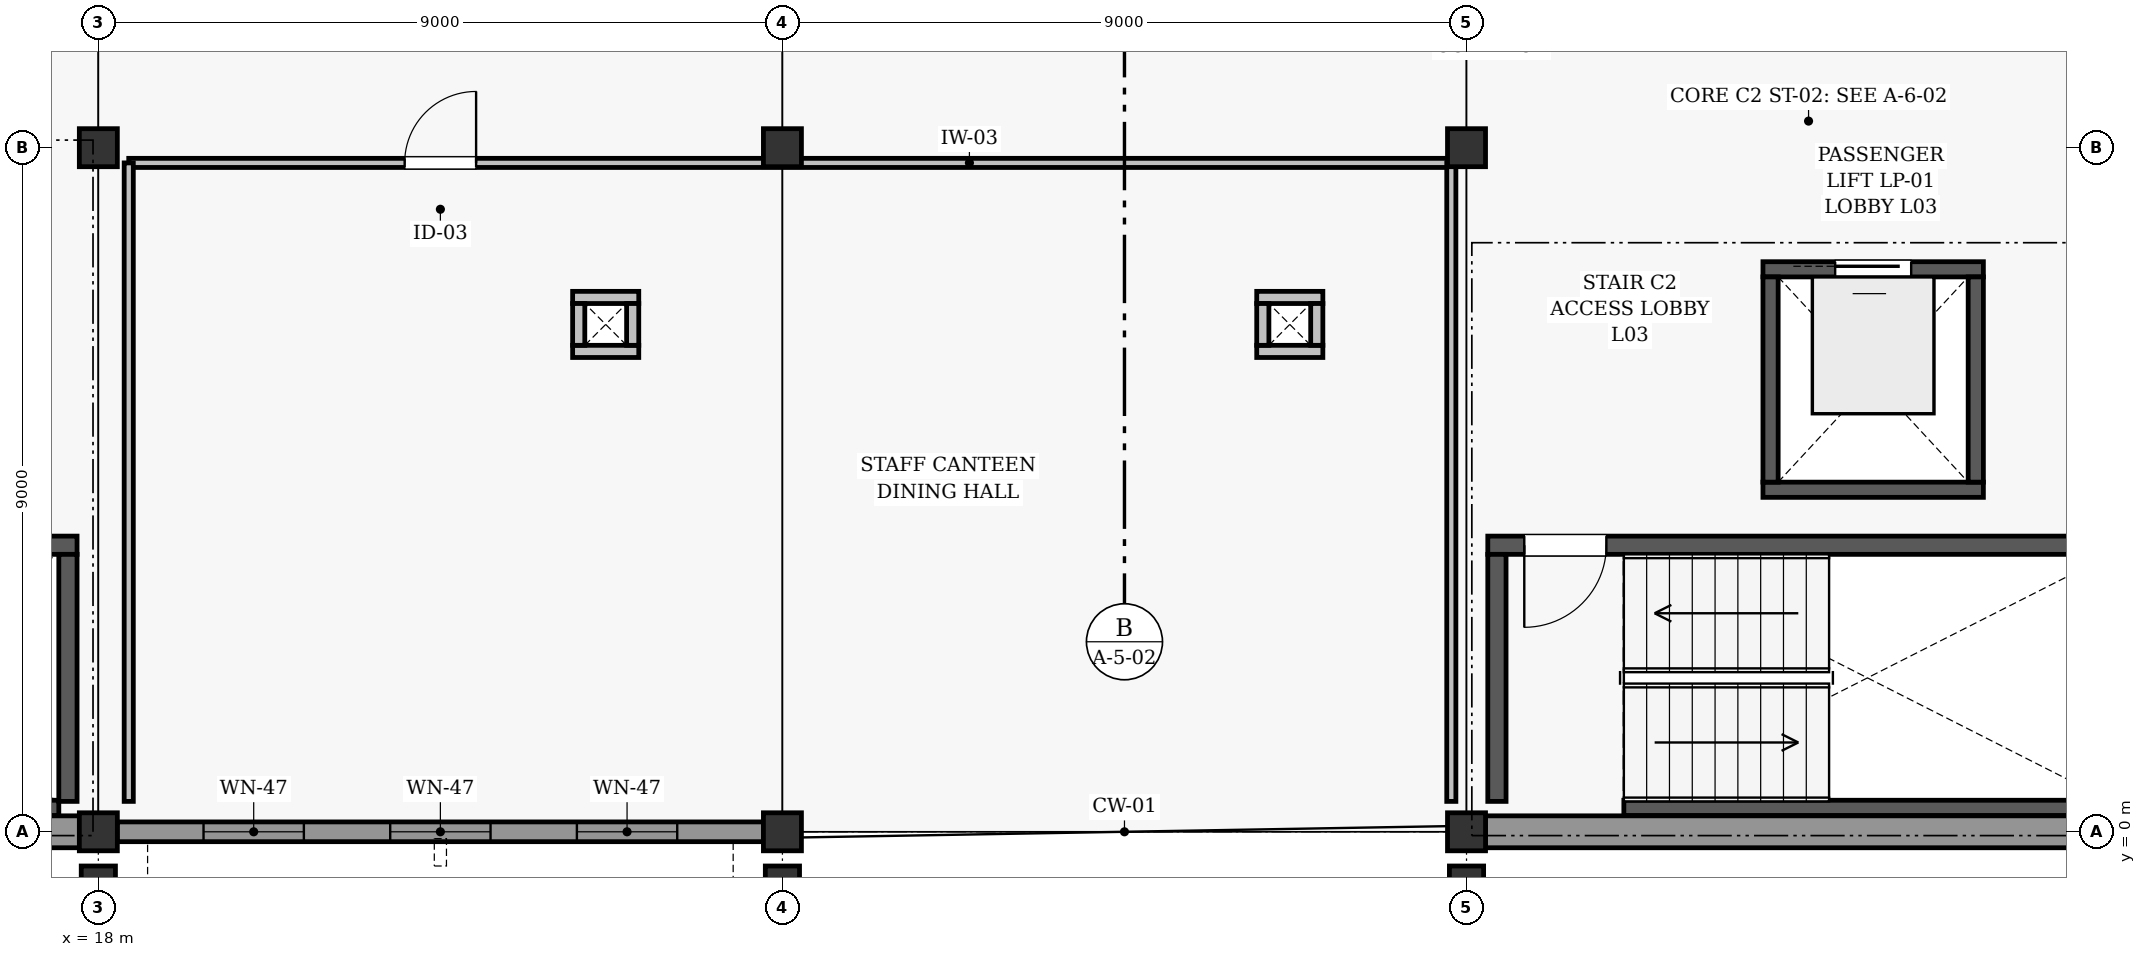
"""IFC4 building model, lengths in metres.
Left out: names, types, materials, properties, quantities, classifications, styles, units other than length and angle.
Written with IfcOpenShell. Run it as: python <this file> out.ifc"""

import sys

from ifc_helpers import new_model, si_unit, direction, frame, frame_2d, origin, origin_2d, place, context, subcontext, project, spatial, rectangle, extrude, element, fill, save


model = new_model("IFC4")
c1 = context("Model", 3, precision=1e-05, world=origin(), true_north=direction((0.0, 1.0)))
c2 = subcontext(c1, "Body", "Model", "MODEL_VIEW")
j1 = project(units=[si_unit("LENGTHUNIT", "METRE"), si_unit("PLANEANGLEUNIT", "RADIAN")], contexts=[c1])
p1 = place(None, origin())
s1 = spatial("IfcSite", under=j1, at=p1, CompositionType="ELEMENT")
p2 = place(p1, origin())
s2 = spatial("IfcBuilding", under=s1, at=p2, CompositionType="ELEMENT")
p3 = place(p2, frame((0.0, 0.0, 12.0)))
s3 = spatial("IfcBuildingStorey", under=s2, at=p3, CompositionType="ELEMENT", Elevation=12.0)
for number, where, z_axis, x_axis in (
    (1, (18.0, 0.0, 0.0), (0.0, 0.0, 1.0), (1.0, 0.0, 0.0)),
    (2, (18.0, 9.0, 0.0), (0.0, 0.0, 1.0), (1.0, 0.0, 0.0)),
    (3, (27.0, 0.0, 0.0), (0.0, 0.0, 1.0), (1.0, 0.0, 0.0)),
    (4, (27.0, 9.0, 0.0), (0.0, 0.0, 1.0), (1.0, 0.0, 0.0)),
    (5, (36.0, 0.0, 0.0), (0.0, 0.0, 1.0), (1.0, 0.0, 0.0)),
    (6, (36.0, 9.0, 0.0), (0.0, 0.0, 1.0), (1.0, 0.0, 0.0)),
):
    element("IfcColumn", number, at=place(p3, frame(where, z_axis=z_axis, x_axis=x_axis)), inside=s3, PredefinedType="COLUMN", context=c2, shape_type="SweptSolid", body=[
        extrude(rectangle(XDim=0.5, YDim=0.5, at=origin_2d()), origin(), (0.0, 0.0, 1.0), 3.0),
    ])
for number, where, z_axis, x_axis in (
    (7, (18.0, -0.75, 0.0), (0.0, 0.0, 1.0), (1.0, 0.0, 0.0)),
    (8, (27.0, -0.75, 0.0), (0.0, 0.0, 1.0), (1.0, 0.0, 0.0)),
    (9, (36.0, -0.75, 0.0), (0.0, 0.0, 1.0), (1.0, 0.0, 0.0)),
):
    element("IfcColumn", number, at=place(p3, frame(where, z_axis=z_axis, x_axis=x_axis)), inside=s3, PredefinedType="PILASTER", context=c2, shape_type="SweptSolid", body=[
        extrude(rectangle(XDim=0.45, YDim=0.6, at=origin_2d()), origin(), (0.0, 0.0, 1.0), 3.0),
    ])
p4 = place(p3, frame((9.248, 0.0, 0.0), z_axis=(0.0, 0.0, 1.0), x_axis=(1.0, 0.0, 0.0)))
e10 = element("IfcWall", 10, at=p4, inside=s3, PredefinedType="SOLIDWALL", context=c2, shape_type="SweptSolid", body=[
    extrude(rectangle(XDim=8.504, YDim=0.42, at=frame_2d((4.252, 0.0))), origin(), (0.0, 0.0, 1.0), 2.262),
])
p5 = place(p3, frame((18.248, 0.0, 0.0), z_axis=(0.0, 0.0, 1.0), x_axis=(1.0, 0.0, 0.0)))
e11 = element("IfcWall", 11, at=p5, inside=s3, PredefinedType="SOLIDWALL", context=c2, shape_type="SweptSolid", body=[
    extrude(rectangle(XDim=8.504, YDim=0.26, at=frame_2d((4.252, 0.0))), origin(), (0.0, 0.0, 1.0), 2.262),
])
p6 = place(p5, frame((1.136, 0.0, 0.8)))
e12 = element("IfcOpeningElement", 12, at=p6, cuts=e11, PredefinedType="OPENING", context=c2, shape_type="SweptSolid", body=[
    extrude(rectangle(XDim=1.32, YDim=1.14, at=frame_2d((0.66, 0.57))), frame((0.0, 0.14, 0.0), z_axis=(0.0, -1.0, 0.0), x_axis=(1.0, 0.0, 0.0)), (0.0, 0.0, 1.0), 0.28),
])
p7 = place(p5, frame((3.592, 0.0, 0.8)))
e13 = element("IfcOpeningElement", 13, at=p7, cuts=e11, PredefinedType="OPENING", context=c2, shape_type="SweptSolid", body=[
    extrude(rectangle(XDim=1.32, YDim=1.14, at=frame_2d((0.66, 0.57))), frame((0.0, 0.14, 0.0), z_axis=(0.0, -1.0, 0.0), x_axis=(1.0, 0.0, 0.0)), (0.0, 0.0, 1.0), 0.28),
])
p8 = place(p5, frame((6.048, 0.0, 0.8)))
e14 = element("IfcOpeningElement", 14, at=p8, cuts=e11, PredefinedType="OPENING", context=c2, shape_type="SweptSolid", body=[
    extrude(rectangle(XDim=1.32, YDim=1.14, at=frame_2d((0.66, 0.57))), frame((0.0, 0.14, 0.0), z_axis=(0.0, -1.0, 0.0), x_axis=(1.0, 0.0, 0.0)), (0.0, 0.0, 1.0), 0.28),
])
p9 = place(p3, frame((36.248, 0.0, 0.0), z_axis=(0.0, 0.0, 1.0), x_axis=(1.0, 0.0, 0.0)))
e15 = element("IfcWall", 15, at=p9, inside=s3, PredefinedType="SOLIDWALL", context=c2, shape_type="SweptSolid", body=[
    extrude(rectangle(XDim=8.504, YDim=0.42, at=frame_2d((4.252, 0.0))), origin(), (0.0, 0.0, 1.0), 2.262),
])
p10 = place(p3, frame((11.07, 0.315, 0.0), z_axis=(0.0, 0.0, 1.0), x_axis=(1.0, 0.0, 0.0)))
e16 = element("IfcWall", 16, at=p10, inside=s3, PredefinedType="SHEAR", context=c2, shape_type="SweptSolid", body=[
    extrude(rectangle(XDim=6.41, YDim=0.2, at=frame_2d((3.205, 0.0))), origin(), (0.0, 0.0, 1.0), 2.75),
])
p11 = place(p3, frame((9.28, 3.77, 0.0), z_axis=(0.0, 0.0, 1.0), x_axis=(1.0, 0.0, 0.0)))
e17 = element("IfcWall", 17, at=p11, inside=s3, PredefinedType="SHEAR", context=c2, shape_type="SweptSolid", body=[
    extrude(rectangle(XDim=8.44, YDim=0.24, at=frame_2d((4.22, 0.0))), origin(), (0.0, 0.0, 1.0), 2.75),
])
p12 = place(p11, frame((0.48, 0.0, 0.0)))
e18 = element("IfcOpeningElement", 18, at=p12, cuts=e17, PredefinedType="OPENING", context=c2, shape_type="SweptSolid", body=[
    extrude(rectangle(XDim=1.08, YDim=2.08, at=frame_2d((0.54, 1.04))), frame((0.0, 0.13, 0.0), z_axis=(0.0, -1.0, 0.0), x_axis=(1.0, 0.0, 0.0)), (0.0, 0.0, 1.0), 0.26),
])
p13 = place(p3, frame((17.6, 0.4, 0.0), z_axis=(0.0, 0.0, 1.0), x_axis=(0.0, 1.0, 0.0)))
e19 = element("IfcWall", 19, at=p13, inside=s3, PredefinedType="SHEAR", context=c2, shape_type="SweptSolid", body=[
    extrude(rectangle(XDim=3.25, YDim=0.24, at=frame_2d((1.625, 0.0))), origin(), (0.0, 0.0, 1.0), 2.75),
])
p14 = place(p3, frame((38.07, 0.315, 0.0), z_axis=(0.0, 0.0, 1.0), x_axis=(1.0, 0.0, 0.0)))
e20 = element("IfcWall", 20, at=p14, inside=s3, PredefinedType="SHEAR", context=c2, shape_type="SweptSolid", body=[
    extrude(rectangle(XDim=6.41, YDim=0.2, at=frame_2d((3.205, 0.0))), origin(), (0.0, 0.0, 1.0), 2.75),
])
p15 = place(p3, frame((36.28, 3.77, 0.0), z_axis=(0.0, 0.0, 1.0), x_axis=(1.0, 0.0, 0.0)))
e21 = element("IfcWall", 21, at=p15, inside=s3, PredefinedType="SHEAR", context=c2, shape_type="SweptSolid", body=[
    extrude(rectangle(XDim=8.44, YDim=0.24, at=frame_2d((4.22, 0.0))), origin(), (0.0, 0.0, 1.0), 2.75),
])
p16 = place(p15, frame((0.48, 0.0, 0.0)))
e22 = element("IfcOpeningElement", 22, at=p16, cuts=e21, PredefinedType="OPENING", context=c2, shape_type="SweptSolid", body=[
    extrude(rectangle(XDim=1.08, YDim=2.08, at=frame_2d((0.54, 1.04))), frame((0.0, 0.13, 0.0), z_axis=(0.0, -1.0, 0.0), x_axis=(1.0, 0.0, 0.0)), (0.0, 0.0, 1.0), 0.26),
])
p17 = place(p3, frame((36.4, 0.4, 0.0), z_axis=(0.0, 0.0, 1.0), x_axis=(0.0, 1.0, 0.0)))
e23 = element("IfcWall", 23, at=p17, inside=s3, PredefinedType="SHEAR", context=c2, shape_type="SweptSolid", body=[
    extrude(rectangle(XDim=3.25, YDim=0.24, at=frame_2d((1.625, 0.0))), origin(), (0.0, 0.0, 1.0), 2.75),
])
p18 = place(p3, frame((39.9, 4.5, 0.0), z_axis=(0.0, 0.0, 1.0), x_axis=(1.0, 0.0, 0.0)))
e24 = element("IfcWall", 24, at=p18, inside=s3, PredefinedType="SHEAR", context=c2, shape_type="SweptSolid", body=[
    extrude(rectangle(XDim=2.9, YDim=0.2, at=frame_2d((1.45, 0.0))), origin(), (0.0, 0.0, 1.0), 2.75),
])
p19 = place(p3, frame((39.9, 7.4, 0.0), z_axis=(0.0, 0.0, 1.0), x_axis=(1.0, 0.0, 0.0)))
e25 = element("IfcWall", 25, at=p19, inside=s3, PredefinedType="SHEAR", context=c2, shape_type="SweptSolid", body=[
    extrude(rectangle(XDim=2.9, YDim=0.2, at=frame_2d((1.45, 0.0))), origin(), (0.0, 0.0, 1.0), 2.75),
])
p20 = place(p19, frame((0.95, 0.0, 0.0)))
e26 = element("IfcOpeningElement", 26, at=p20, cuts=e25, PredefinedType="OPENING", context=c2, shape_type="SweptSolid", body=[
    extrude(rectangle(XDim=1.0, YDim=2.1, at=frame_2d((0.5, 1.05))), frame((0.0, 0.11, 0.0), z_axis=(0.0, -1.0, 0.0), x_axis=(1.0, 0.0, 0.0)), (0.0, 0.0, 1.0), 0.22),
])
for number, where, z_axis, x_axis in (
    (27, (40.0, 4.6, 0.0), (0.0, 0.0, 1.0), (0.0, 1.0, 0.0)),
    (28, (42.7, 4.6, 0.0), (0.0, 0.0, 1.0), (0.0, 1.0, 0.0)),
):
    element("IfcWall", number, at=place(p3, frame(where, z_axis=z_axis, x_axis=x_axis)), inside=s3, PredefinedType="SHEAR", context=c2, shape_type="SweptSolid", body=[
        extrude(rectangle(XDim=2.7, YDim=0.2, at=frame_2d((1.35, 0.0))), origin(), (0.0, 0.0, 1.0), 2.75),
    ])
for number, where, z_axis, x_axis in (
    (29, (24.24, 6.32, 0.0), (0.0, 0.0, 1.0), (1.0, 0.0, 0.0)),
    (30, (24.24, 7.03, 0.0), (0.0, 0.0, 1.0), (1.0, 0.0, 0.0)),
):
    element("IfcWall", number, at=place(p3, frame(where, z_axis=z_axis, x_axis=x_axis)), inside=s3, PredefinedType="PARTITIONING", context=c2, shape_type="SweptSolid", body=[
        extrude(rectangle(XDim=0.87, YDim=0.16, at=frame_2d((0.435, 0.0))), origin(), (0.0, 0.0, 1.0), 2.75),
    ])
for number, where, z_axis, x_axis in (
    (31, (24.32, 6.4, 0.0), (0.0, 0.0, 1.0), (0.0, 1.0, 0.0)),
    (32, (25.03, 6.4, 0.0), (0.0, 0.0, 1.0), (0.0, 1.0, 0.0)),
):
    element("IfcWall", number, at=place(p3, frame(where, z_axis=z_axis, x_axis=x_axis)), inside=s3, PredefinedType="PARTITIONING", context=c2, shape_type="SweptSolid", body=[
        extrude(rectangle(XDim=0.55, YDim=0.16, at=frame_2d((0.275, 0.0))), origin(), (0.0, 0.0, 1.0), 2.75),
    ])
for number, where, z_axis, x_axis in (
    (33, (33.24, 6.32, 0.0), (0.0, 0.0, 1.0), (1.0, 0.0, 0.0)),
    (34, (33.24, 7.03, 0.0), (0.0, 0.0, 1.0), (1.0, 0.0, 0.0)),
):
    element("IfcWall", number, at=place(p3, frame(where, z_axis=z_axis, x_axis=x_axis)), inside=s3, PredefinedType="PARTITIONING", context=c2, shape_type="SweptSolid", body=[
        extrude(rectangle(XDim=0.87, YDim=0.16, at=frame_2d((0.435, 0.0))), origin(), (0.0, 0.0, 1.0), 2.75),
    ])
for number, where, z_axis, x_axis in (
    (35, (33.32, 6.4, 0.0), (0.0, 0.0, 1.0), (0.0, 1.0, 0.0)),
    (36, (34.03, 6.4, 0.0), (0.0, 0.0, 1.0), (0.0, 1.0, 0.0)),
):
    element("IfcWall", number, at=place(p3, frame(where, z_axis=z_axis, x_axis=x_axis)), inside=s3, PredefinedType="PARTITIONING", context=c2, shape_type="SweptSolid", body=[
        extrude(rectangle(XDim=0.55, YDim=0.16, at=frame_2d((0.275, 0.0))), origin(), (0.0, 0.0, 1.0), 2.75),
    ])
p21 = place(p3, frame((18.4, 8.8, 0.0), z_axis=(0.0, 0.0, 1.0), x_axis=(1.0, 0.0, 0.0)))
e37 = element("IfcWall", 37, at=p21, inside=s3, PredefinedType="PARTITIONING", context=c2, shape_type="SweptSolid", body=[
    extrude(rectangle(XDim=17.4, YDim=0.12, at=frame_2d((8.7, 0.0))), origin(), (0.0, 0.0, 1.0), 2.295),
])
p22 = place(p21, frame((3.63, 0.0, 0.0)))
e38 = element("IfcOpeningElement", 38, at=p22, cuts=e37, PredefinedType="OPENING", context=c2, shape_type="SweptSolid", body=[
    extrude(rectangle(XDim=0.94, YDim=2.06, at=frame_2d((0.47, 1.03))), frame((0.0, 0.07, 0.0), z_axis=(0.0, -1.0, 0.0), x_axis=(1.0, 0.0, 0.0)), (0.0, 0.0, 1.0), 0.14),
])
for number, where, z_axis, x_axis in (
    (39, (18.4, 0.4, 0.0), (0.0, 0.0, 1.0), (0.0, 1.0, 0.0)),
    (40, (35.8, 0.4, 0.0), (0.0, 0.0, 1.0), (0.0, 1.0, 0.0)),
):
    element("IfcWall", number, at=place(p3, frame(where, z_axis=z_axis, x_axis=x_axis)), inside=s3, PredefinedType="PARTITIONING", context=c2, shape_type="SweptSolid", body=[
        extrude(rectangle(XDim=8.4, YDim=0.12, at=frame_2d((4.2, 0.0))), origin(), (0.0, 0.0, 1.0), 2.295),
    ])
p23 = place(p6, origin())
e41 = element("IfcWindow", 41, at=p23, inside=s3, PartitioningType="SINGLE_PANEL", PredefinedType="WINDOW", context=c2, shape_type="SweptSolid", body=[
    extrude(rectangle(XDim=1.32, YDim=1.14, at=frame_2d((0.66, 0.57))), frame((0.0, 0.03, 0.0), z_axis=(0.0, -1.0, 0.0), x_axis=(1.0, 0.0, 0.0)), (0.0, 0.0, 1.0), 0.06),
])
fill(e12, e41)
p24 = place(p7, origin())
e42 = element("IfcWindow", 42, at=p24, inside=s3, PartitioningType="SINGLE_PANEL", PredefinedType="WINDOW", context=c2, shape_type="SweptSolid", body=[
    extrude(rectangle(XDim=1.32, YDim=1.14, at=frame_2d((0.66, 0.57))), frame((0.0, 0.03, 0.0), z_axis=(0.0, -1.0, 0.0), x_axis=(1.0, 0.0, 0.0)), (0.0, 0.0, 1.0), 0.06),
])
fill(e13, e42)
p25 = place(p8, origin())
e43 = element("IfcWindow", 43, at=p25, inside=s3, PartitioningType="SINGLE_PANEL", PredefinedType="WINDOW", context=c2, shape_type="SweptSolid", body=[
    extrude(rectangle(XDim=1.32, YDim=1.14, at=frame_2d((0.66, 0.57))), frame((0.0, 0.03, 0.0), z_axis=(0.0, -1.0, 0.0), x_axis=(1.0, 0.0, 0.0)), (0.0, 0.0, 1.0), 0.06),
])
fill(e14, e43)
p26 = place(p16, frame((1.08, 0.0, 0.0), z_axis=(0.0, 0.0, 1.0), x_axis=(-1.0, 0.0, 0.0)))
e44 = element("IfcDoor", 44, at=p26, inside=s3, OperationType="SINGLE_SWING_LEFT", PredefinedType="DOOR", context=c2, shape_type="SweptSolid", body=[
    extrude(rectangle(XDim=1.08, YDim=2.08, at=frame_2d((0.54, 1.04))), frame((0.0, 0.025, 0.0), z_axis=(0.0, -1.0, 0.0), x_axis=(1.0, 0.0, 0.0)), (0.0, 0.0, 1.0), 0.05),
])
fill(e22, e44)
p27 = place(p20, origin())
e45 = element("IfcDoor", 45, at=p27, inside=s3, OperationType="SLIDING_TO_LEFT", PredefinedType="DOOR", context=c2, shape_type="SweptSolid", body=[
    extrude(rectangle(XDim=1.0, YDim=2.1, at=frame_2d((0.5, 1.05))), frame((0.0, 0.025, 0.0), z_axis=(0.0, -1.0, 0.0), x_axis=(1.0, 0.0, 0.0)), (0.0, 0.0, 1.0), 0.05),
])
fill(e26, e45)
p28 = place(p22, origin())
e46 = element("IfcDoor", 46, at=p28, inside=s3, OperationType="SINGLE_SWING_RIGHT", PredefinedType="DOOR", context=c2, shape_type="SweptSolid", body=[
    extrude(rectangle(XDim=0.94, YDim=2.06, at=frame_2d((0.47, 1.03))), frame((0.0, 0.025, 0.0), z_axis=(0.0, -1.0, 0.0), x_axis=(1.0, 0.0, 0.0)), (0.0, 0.0, 1.0), 0.05),
])
fill(e38, e46)
save(model, sys.argv[1])
